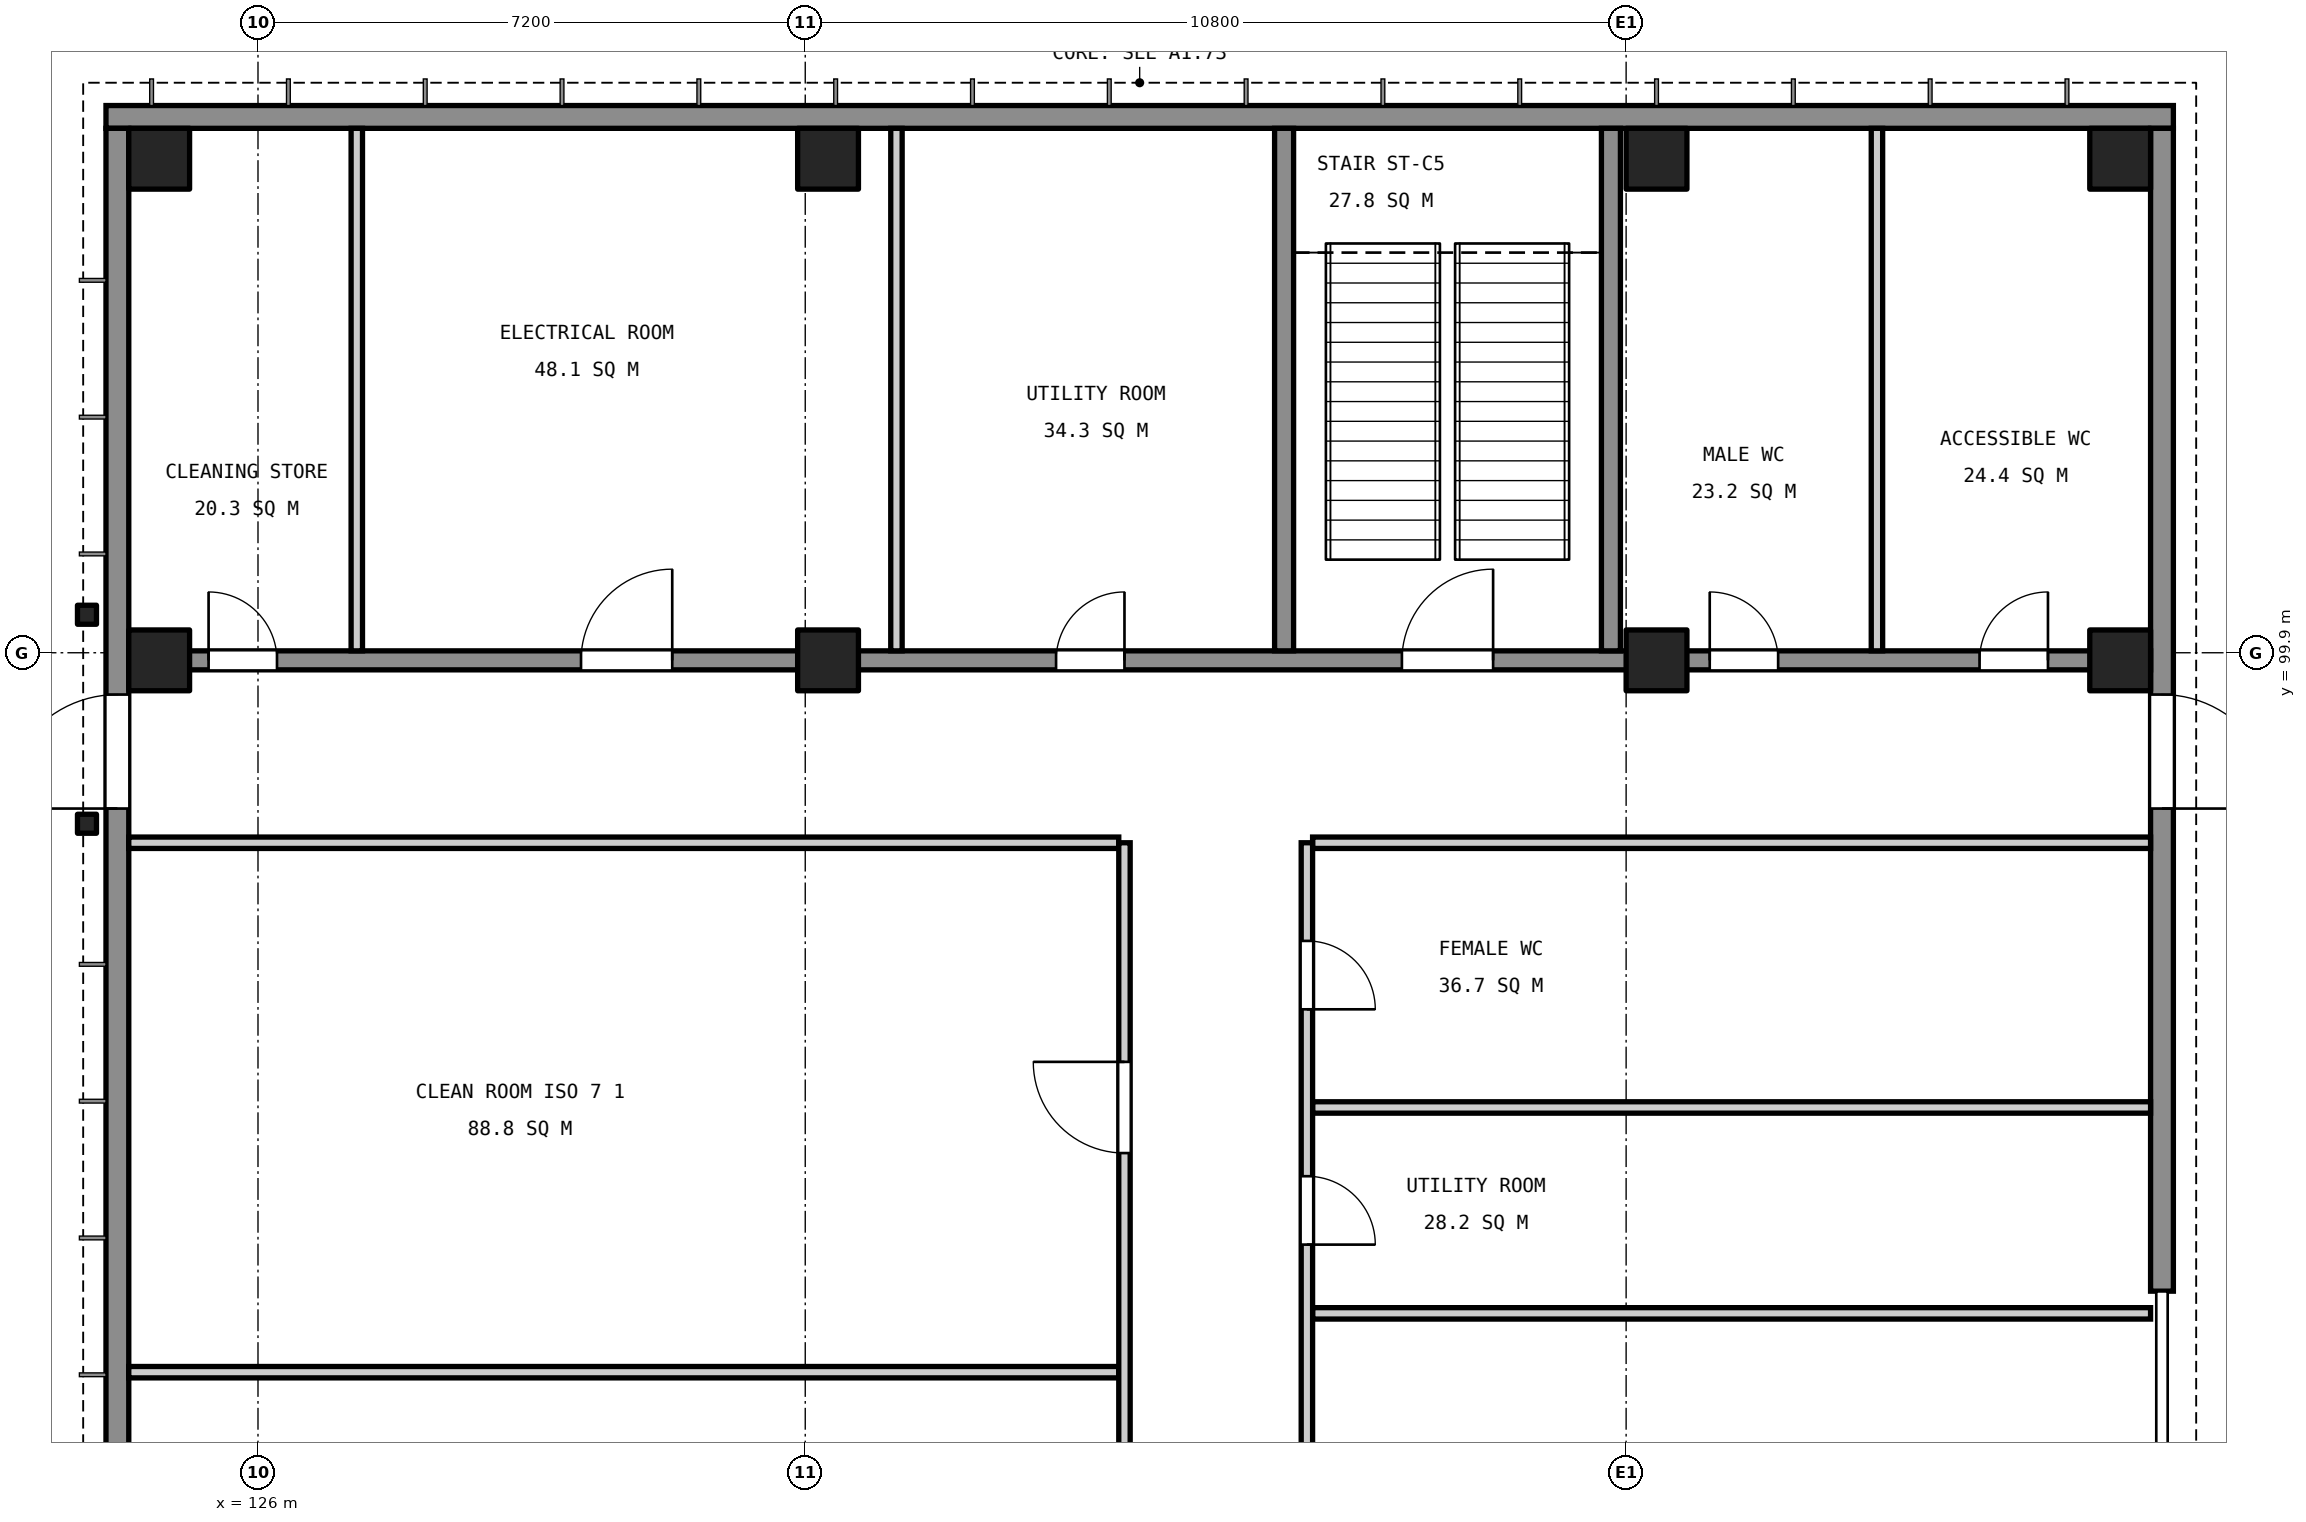
"""IFC4 building model, lengths in metres.
Left out: names, types, materials, properties, quantities, classifications, styles, units other than length and angle.
Written with IfcOpenShell. Run it as: python <this file> out.ifc"""

import sys

from ifc_helpers import new_model, si_unit, direction, frame, frame_2d, origin, origin_2d, place, context, subcontext, project, spatial, rectangle, i_section, extrude, element, fill, save


model = new_model("IFC4")
c1 = context("Model", 3, precision=1e-05, world=origin(), true_north=direction((0.0, 1.0)))
c2 = subcontext(c1, "Body", "Model", "MODEL_VIEW")
j1 = project(units=[si_unit("LENGTHUNIT", "METRE"), si_unit("PLANEANGLEUNIT", "RADIAN")], contexts=[c1])
p1 = place(None, origin())
s1 = spatial("IfcSite", under=j1, at=p1, CompositionType="ELEMENT")
p2 = place(p1, origin())
s2 = spatial("IfcBuilding", under=s1, at=p2, CompositionType="ELEMENT")
p3 = place(p2, origin())
s3 = spatial("IfcBuildingStorey", under=s2, at=p3, CompositionType="ELEMENT", Elevation=0.0)
for number, where, z_axis, x_axis in (
    (1, (124.7, 99.8, 0.0), (0.0, 0.0, 1.0), (1.0, 0.0, 0.0)),
    (2, (124.7, 106.4, 0.0), (0.0, 0.0, 1.0), (1.0, 0.0, 0.0)),
    (3, (133.5, 99.8, 0.0), (0.0, 0.0, 1.0), (1.0, 0.0, 0.0)),
    (4, (133.5, 106.4, 0.0), (0.0, 0.0, 1.0), (1.0, 0.0, 0.0)),
    (5, (144.4, 99.8, 0.0), (0.0, 0.0, 1.0), (1.0, 0.0, 0.0)),
    (6, (144.4, 106.4, 0.0), (0.0, 0.0, 1.0), (1.0, 0.0, 0.0)),
    (7, (150.5, 99.8, 0.0), (0.0, 0.0, 1.0), (1.0, 0.0, 0.0)),
    (8, (150.5, 106.4, 0.0), (0.0, 0.0, 1.0), (1.0, 0.0, 0.0)),
):
    element("IfcColumn", number, at=place(p3, frame(where, z_axis=z_axis, x_axis=x_axis)), inside=s3, PredefinedType="COLUMN", context=c2, shape_type="SweptSolid", body=[
        extrude(rectangle(XDim=0.8, YDim=0.8, at=origin_2d()), origin(), (0.0, 0.0, 1.0), 6.0),
    ])
p4 = place(p3, frame((124.0, 106.95, 0.0), z_axis=(0.0, 0.0, 1.0), x_axis=(1.0, 0.0, 0.0)))
e9 = element("IfcWall", 9, at=p4, inside=s3, PredefinedType="SOLIDWALL", context=c2, shape_type="SweptSolid", body=[
    extrude(rectangle(XDim=27.2, YDim=0.3, at=frame_2d((13.6, 0.0))), origin(), (0.0, 0.0, 1.0), 5.55),
])
p5 = place(p3, frame((124.15, 70.3, 0.0), z_axis=(0.0, 0.0, 1.0), x_axis=(0.0, 1.0, 0.0)))
e10 = element("IfcWall", 10, at=p5, inside=s3, PredefinedType="SOLIDWALL", context=c2, shape_type="SweptSolid", body=[
    extrude(rectangle(XDim=36.5, YDim=0.3, at=frame_2d((18.25, 0.0))), origin(), (0.0, 0.0, 1.0), 5.55),
])
p6 = place(p5, frame((27.55, 0.0, 0.0)))
e11 = element("IfcOpeningElement", 11, at=p6, cuts=e10, PredefinedType="OPENING", context=c2, shape_type="SweptSolid", body=[
    extrude(rectangle(XDim=1.5, YDim=2.4, at=frame_2d((0.75, 1.2))), frame((0.0, 0.16, 0.0), z_axis=(0.0, -1.0, 0.0), x_axis=(1.0, 0.0, 0.0)), (0.0, 0.0, 1.0), 0.32),
])
p7 = place(p3, frame((151.05, 91.5, 0.0), z_axis=(0.0, 0.0, 1.0), x_axis=(0.0, 1.0, 0.0)))
e12 = element("IfcWall", 12, at=p7, inside=s3, PredefinedType="SOLIDWALL", context=c2, shape_type="SweptSolid", body=[
    extrude(rectangle(XDim=15.3, YDim=0.3, at=frame_2d((7.65, 0.0))), origin(), (0.0, 0.0, 1.0), 5.55),
])
p8 = place(p7, frame((6.35, 0.0, 0.0)))
e13 = element("IfcOpeningElement", 13, at=p8, cuts=e12, PredefinedType="OPENING", context=c2, shape_type="SweptSolid", body=[
    extrude(rectangle(XDim=1.5, YDim=2.4, at=frame_2d((0.75, 1.2))), frame((0.0, 0.16, 0.0), z_axis=(0.0, -1.0, 0.0), x_axis=(1.0, 0.0, 0.0)), (0.0, 0.0, 1.0), 0.32),
])
p9 = place(p3, frame((124.3, 90.434, 0.0), z_axis=(0.0, 0.0, 1.0), x_axis=(1.0, 0.0, 0.0)))
e14 = element("IfcWall", 14, at=p9, inside=s3, PredefinedType="SOLIDWALL", context=c2, shape_type="SweptSolid", body=[
    extrude(rectangle(XDim=13.025, YDim=0.15, at=frame_2d((6.512, 0.0))), origin(), (0.0, 0.0, 1.0), 5.55),
])
for number, where, z_axis, x_axis in (
    (15, (139.875, 91.208, 0.0), (0.0, 0.0, 1.0), (1.0, 0.0, 0.0)),
    (16, (139.875, 93.917, 0.0), (0.0, 0.0, 1.0), (1.0, 0.0, 0.0)),
):
    element("IfcWall", number, at=place(p3, frame(where, z_axis=z_axis, x_axis=x_axis)), inside=s3, PredefinedType="SOLIDWALL", context=c2, shape_type="SweptSolid", body=[
        extrude(rectangle(XDim=11.025, YDim=0.15, at=frame_2d((5.512, 0.0))), origin(), (0.0, 0.0, 1.0), 5.55),
    ])
p10 = place(p3, frame((124.3, 97.4, 0.0), z_axis=(0.0, 0.0, 1.0), x_axis=(1.0, 0.0, 0.0)))
e17 = element("IfcWall", 17, at=p10, inside=s3, PredefinedType="SOLIDWALL", context=c2, shape_type="SweptSolid", body=[
    extrude(rectangle(XDim=13.025, YDim=0.15, at=frame_2d((6.512, 0.0))), origin(), (0.0, 0.0, 1.0), 5.55),
])
p11 = place(p3, frame((139.875, 97.4, 0.0), z_axis=(0.0, 0.0, 1.0), x_axis=(1.0, 0.0, 0.0)))
e18 = element("IfcWall", 18, at=p11, inside=s3, PredefinedType="SOLIDWALL", context=c2, shape_type="SweptSolid", body=[
    extrude(rectangle(XDim=11.025, YDim=0.15, at=frame_2d((5.512, 0.0))), origin(), (0.0, 0.0, 1.0), 5.55),
])
p12 = place(p3, frame((124.3, 99.8, 0.0), z_axis=(0.0, 0.0, 1.0), x_axis=(1.0, 0.0, 0.0)))
e19 = element("IfcWall", 19, at=p12, inside=s3, PredefinedType="SOLIDWALL", context=c2, shape_type="SweptSolid", body=[
    extrude(rectangle(XDim=26.6, YDim=0.25, at=frame_2d((13.3, 0.0))), origin(), (0.0, 0.0, 1.0), 5.55),
])
p13 = place(p12, frame((1.05, 0.0, 0.0)))
e20 = element("IfcOpeningElement", 20, at=p13, cuts=e19, PredefinedType="OPENING", context=c2, shape_type="SweptSolid", body=[
    extrude(rectangle(XDim=0.9, YDim=2.1, at=frame_2d((0.45, 1.05))), frame((0.0, 0.135, 0.0), z_axis=(0.0, -1.0, 0.0), x_axis=(1.0, 0.0, 0.0)), (0.0, 0.0, 1.0), 0.27),
])
p14 = place(p12, frame((5.95, 0.0, 0.0)))
e21 = element("IfcOpeningElement", 21, at=p14, cuts=e19, PredefinedType="OPENING", context=c2, shape_type="SweptSolid", body=[
    extrude(rectangle(XDim=1.2, YDim=2.1, at=frame_2d((0.6, 1.05))), frame((0.0, 0.135, 0.0), z_axis=(0.0, -1.0, 0.0), x_axis=(1.0, 0.0, 0.0)), (0.0, 0.0, 1.0), 0.27),
])
p15 = place(p12, frame((20.8, 0.0, 0.0)))
e22 = element("IfcOpeningElement", 22, at=p15, cuts=e19, PredefinedType="OPENING", context=c2, shape_type="SweptSolid", body=[
    extrude(rectangle(XDim=0.9, YDim=2.1, at=frame_2d((0.45, 1.05))), frame((0.0, 0.135, 0.0), z_axis=(0.0, -1.0, 0.0), x_axis=(1.0, 0.0, 0.0)), (0.0, 0.0, 1.0), 0.27),
])
p16 = place(p12, frame((24.35, 0.0, 0.0)))
e23 = element("IfcOpeningElement", 23, at=p16, cuts=e19, PredefinedType="OPENING", context=c2, shape_type="SweptSolid", body=[
    extrude(rectangle(XDim=0.9, YDim=2.1, at=frame_2d((0.45, 1.05))), frame((0.0, 0.135, 0.0), z_axis=(0.0, -1.0, 0.0), x_axis=(1.0, 0.0, 0.0)), (0.0, 0.0, 1.0), 0.27),
])
p17 = place(p12, frame((12.2, 0.0, 0.0)))
e24 = element("IfcOpeningElement", 24, at=p17, cuts=e19, PredefinedType="OPENING", context=c2, shape_type="SweptSolid", body=[
    extrude(rectangle(XDim=0.9, YDim=2.1, at=frame_2d((0.45, 1.05))), frame((0.0, 0.135, 0.0), z_axis=(0.0, -1.0, 0.0), x_axis=(1.0, 0.0, 0.0)), (0.0, 0.0, 1.0), 0.27),
])
p18 = place(p12, frame((16.75, 0.0, 0.0)))
e25 = element("IfcOpeningElement", 25, at=p18, cuts=e19, PredefinedType="OPENING", context=c2, shape_type="SweptSolid", body=[
    extrude(rectangle(XDim=1.2, YDim=2.1, at=frame_2d((0.6, 1.05))), frame((0.0, 0.135, 0.0), z_axis=(0.0, -1.0, 0.0), x_axis=(1.0, 0.0, 0.0)), (0.0, 0.0, 1.0), 0.27),
])
for number, where, z_axis, x_axis in (
    (26, (127.3, 99.925, 0.0), (0.0, 0.0, 1.0), (0.0, 1.0, 0.0)),
    (27, (134.4, 99.925, 0.0), (0.0, 0.0, 1.0), (0.0, 1.0, 0.0)),
):
    element("IfcWall", number, at=place(p3, frame(where, z_axis=z_axis, x_axis=x_axis)), inside=s3, PredefinedType="SOLIDWALL", context=c2, shape_type="SweptSolid", body=[
        extrude(rectangle(XDim=6.875, YDim=0.15, at=frame_2d((3.438, 0.0))), origin(), (0.0, 0.0, 1.0), 5.55),
    ])
p19 = place(p3, frame((137.4, 79.7, 0.0), z_axis=(0.0, 0.0, 1.0), x_axis=(0.0, 1.0, 0.0)))
e28 = element("IfcWall", 28, at=p19, inside=s3, PredefinedType="SOLIDWALL", context=c2, shape_type="SweptSolid", body=[
    extrude(rectangle(XDim=17.7, YDim=0.15, at=frame_2d((8.85, 0.0))), origin(), (0.0, 0.0, 1.0), 5.55),
])
p20 = place(p19, frame((0.8, 0.0, 0.0)))
e29 = element("IfcOpeningElement", 29, at=p20, cuts=e28, PredefinedType="OPENING", context=c2, shape_type="SweptSolid", body=[
    extrude(rectangle(XDim=1.2, YDim=2.1, at=frame_2d((0.6, 1.05))), frame((0.0, 0.085, 0.0), z_axis=(0.0, -1.0, 0.0), x_axis=(1.0, 0.0, 0.0)), (0.0, 0.0, 1.0), 0.17),
])
p21 = place(p19, frame((4.619, 0.0, 0.0)))
e30 = element("IfcOpeningElement", 30, at=p21, cuts=e28, PredefinedType="OPENING", context=c2, shape_type="SweptSolid", body=[
    extrude(rectangle(XDim=1.2, YDim=2.1, at=frame_2d((0.6, 1.05))), frame((0.0, 0.085, 0.0), z_axis=(0.0, -1.0, 0.0), x_axis=(1.0, 0.0, 0.0)), (0.0, 0.0, 1.0), 0.17),
])
p22 = place(p19, frame((8.586, 0.0, 0.0)))
e31 = element("IfcOpeningElement", 31, at=p22, cuts=e28, PredefinedType="OPENING", context=c2, shape_type="SweptSolid", body=[
    extrude(rectangle(XDim=1.2, YDim=2.1, at=frame_2d((0.6, 1.05))), frame((0.0, 0.085, 0.0), z_axis=(0.0, -1.0, 0.0), x_axis=(1.0, 0.0, 0.0)), (0.0, 0.0, 1.0), 0.17),
])
p23 = place(p19, frame((13.617, 0.0, 0.0)))
e32 = element("IfcOpeningElement", 32, at=p23, cuts=e28, PredefinedType="OPENING", context=c2, shape_type="SweptSolid", body=[
    extrude(rectangle(XDim=1.2, YDim=2.1, at=frame_2d((0.6, 1.05))), frame((0.0, 0.085, 0.0), z_axis=(0.0, -1.0, 0.0), x_axis=(1.0, 0.0, 0.0)), (0.0, 0.0, 1.0), 0.17),
])
p24 = place(p3, frame((139.5, 99.925, 0.0), z_axis=(0.0, 0.0, 1.0), x_axis=(0.0, 1.0, 0.0)))
e33 = element("IfcWall", 33, at=p24, inside=s3, PredefinedType="SOLIDWALL", context=c2, shape_type="SweptSolid", body=[
    extrude(rectangle(XDim=6.875, YDim=0.25, at=frame_2d((3.438, 0.0))), origin(), (0.0, 0.0, 1.0), 5.55),
])
p25 = place(p3, frame((139.8, 82.5, 0.0), z_axis=(0.0, 0.0, 1.0), x_axis=(0.0, 1.0, 0.0)))
e34 = element("IfcWall", 34, at=p25, inside=s3, PredefinedType="SOLIDWALL", context=c2, shape_type="SweptSolid", body=[
    extrude(rectangle(XDim=14.9, YDim=0.15, at=frame_2d((7.45, 0.0))), origin(), (0.0, 0.0, 1.0), 5.55),
])
p26 = place(p25, frame((3.754, 0.0, 0.0)))
e35 = element("IfcOpeningElement", 35, at=p26, cuts=e34, PredefinedType="OPENING", context=c2, shape_type="SweptSolid", body=[
    extrude(rectangle(XDim=1.2, YDim=2.1, at=frame_2d((0.6, 1.05))), frame((0.0, 0.085, 0.0), z_axis=(0.0, -1.0, 0.0), x_axis=(1.0, 0.0, 0.0)), (0.0, 0.0, 1.0), 0.17),
])
p27 = place(p25, frame((9.613, 0.0, 0.0)))
e36 = element("IfcOpeningElement", 36, at=p27, cuts=e34, PredefinedType="OPENING", context=c2, shape_type="SweptSolid", body=[
    extrude(rectangle(XDim=0.9, YDim=2.1, at=frame_2d((0.45, 1.05))), frame((0.0, 0.085, 0.0), z_axis=(0.0, -1.0, 0.0), x_axis=(1.0, 0.0, 0.0)), (0.0, 0.0, 1.0), 0.17),
])
p28 = place(p25, frame((12.708, 0.0, 0.0)))
e37 = element("IfcOpeningElement", 37, at=p28, cuts=e34, PredefinedType="OPENING", context=c2, shape_type="SweptSolid", body=[
    extrude(rectangle(XDim=0.9, YDim=2.1, at=frame_2d((0.45, 1.05))), frame((0.0, 0.085, 0.0), z_axis=(0.0, -1.0, 0.0), x_axis=(1.0, 0.0, 0.0)), (0.0, 0.0, 1.0), 0.17),
])
p29 = place(p3, frame((143.8, 99.925, 0.0), z_axis=(0.0, 0.0, 1.0), x_axis=(0.0, 1.0, 0.0)))
e38 = element("IfcWall", 38, at=p29, inside=s3, PredefinedType="SOLIDWALL", context=c2, shape_type="SweptSolid", body=[
    extrude(rectangle(XDim=6.875, YDim=0.25, at=frame_2d((3.438, 0.0))), origin(), (0.0, 0.0, 1.0), 5.55),
])
p30 = place(p3, frame((147.3, 99.925, 0.0), z_axis=(0.0, 0.0, 1.0), x_axis=(0.0, 1.0, 0.0)))
e39 = element("IfcWall", 39, at=p30, inside=s3, PredefinedType="SOLIDWALL", context=c2, shape_type="SweptSolid", body=[
    extrude(rectangle(XDim=6.875, YDim=0.15, at=frame_2d((3.438, 0.0))), origin(), (0.0, 0.0, 1.0), 5.55),
])
for number, where, z_axis, x_axis in (
    (40, (123.75, 97.65, 0.0), (0.0, 0.0, 1.0), (1.0, 0.0, 0.0)),
    (41, (123.75, 100.4, 0.0), (0.0, 0.0, 1.0), (1.0, 0.0, 0.0)),
):
    element("IfcColumn", number, at=place(p3, frame(where, z_axis=z_axis, x_axis=x_axis)), inside=s3, PredefinedType="COLUMN", context=c2, shape_type="SweptSolid", body=[
        extrude(i_section(OverallWidth=0.25, OverallDepth=0.25, WebThickness=0.009, FlangeThickness=0.014, FilletRadius=0.016, at=origin_2d()), origin(), (0.0, 0.0, 1.0), 4.8),
    ])
p31 = place(p23, origin())
e42 = element("IfcDoor", 42, at=p31, inside=s3, OperationType="SINGLE_SWING_RIGHT", PredefinedType="DOOR", context=c2, shape_type="SweptSolid", body=[
    extrude(rectangle(XDim=1.2, YDim=2.1, at=frame_2d((0.6, 1.05))), frame((0.0, 0.025, 0.0), z_axis=(0.0, -1.0, 0.0), x_axis=(1.0, 0.0, 0.0)), (0.0, 0.0, 1.0), 0.05),
])
fill(e32, e42)
p32 = place(p27, frame((0.9, 0.0, 0.0), z_axis=(0.0, 0.0, 1.0), x_axis=(-1.0, 0.0, 0.0)))
e43 = element("IfcDoor", 43, at=p32, inside=s3, OperationType="SINGLE_SWING_RIGHT", PredefinedType="DOOR", context=c2, shape_type="SweptSolid", body=[
    extrude(rectangle(XDim=0.9, YDim=2.1, at=frame_2d((0.45, 1.05))), frame((0.0, 0.025, 0.0), z_axis=(0.0, -1.0, 0.0), x_axis=(1.0, 0.0, 0.0)), (0.0, 0.0, 1.0), 0.05),
])
fill(e36, e43)
p33 = place(p28, frame((0.9, 0.0, 0.0), z_axis=(0.0, 0.0, 1.0), x_axis=(-1.0, 0.0, 0.0)))
e44 = element("IfcDoor", 44, at=p33, inside=s3, OperationType="SINGLE_SWING_RIGHT", PredefinedType="DOOR", context=c2, shape_type="SweptSolid", body=[
    extrude(rectangle(XDim=0.9, YDim=2.1, at=frame_2d((0.45, 1.05))), frame((0.0, 0.025, 0.0), z_axis=(0.0, -1.0, 0.0), x_axis=(1.0, 0.0, 0.0)), (0.0, 0.0, 1.0), 0.05),
])
fill(e37, e44)
p34 = place(p13, origin())
e45 = element("IfcDoor", 45, at=p34, inside=s3, OperationType="SINGLE_SWING_LEFT", PredefinedType="DOOR", context=c2, shape_type="SweptSolid", body=[
    extrude(rectangle(XDim=0.9, YDim=2.1, at=frame_2d((0.45, 1.05))), frame((0.0, 0.025, 0.0), z_axis=(0.0, -1.0, 0.0), x_axis=(1.0, 0.0, 0.0)), (0.0, 0.0, 1.0), 0.05),
])
fill(e20, e45)
p35 = place(p14, origin())
e46 = element("IfcDoor", 46, at=p35, inside=s3, OperationType="SINGLE_SWING_RIGHT", PredefinedType="DOOR", context=c2, shape_type="SweptSolid", body=[
    extrude(rectangle(XDim=1.2, YDim=2.1, at=frame_2d((0.6, 1.05))), frame((0.0, 0.025, 0.0), z_axis=(0.0, -1.0, 0.0), x_axis=(1.0, 0.0, 0.0)), (0.0, 0.0, 1.0), 0.05),
])
fill(e21, e46)
p36 = place(p15, origin())
e47 = element("IfcDoor", 47, at=p36, inside=s3, OperationType="SINGLE_SWING_LEFT", PredefinedType="DOOR", context=c2, shape_type="SweptSolid", body=[
    extrude(rectangle(XDim=0.9, YDim=2.1, at=frame_2d((0.45, 1.05))), frame((0.0, 0.025, 0.0), z_axis=(0.0, -1.0, 0.0), x_axis=(1.0, 0.0, 0.0)), (0.0, 0.0, 1.0), 0.05),
])
fill(e22, e47)
p37 = place(p16, origin())
e48 = element("IfcDoor", 48, at=p37, inside=s3, OperationType="SINGLE_SWING_RIGHT", PredefinedType="DOOR", context=c2, shape_type="SweptSolid", body=[
    extrude(rectangle(XDim=0.9, YDim=2.1, at=frame_2d((0.45, 1.05))), frame((0.0, 0.025, 0.0), z_axis=(0.0, -1.0, 0.0), x_axis=(1.0, 0.0, 0.0)), (0.0, 0.0, 1.0), 0.05),
])
fill(e23, e48)
p38 = place(p17, origin())
e49 = element("IfcDoor", 49, at=p38, inside=s3, OperationType="SINGLE_SWING_RIGHT", PredefinedType="DOOR", context=c2, shape_type="SweptSolid", body=[
    extrude(rectangle(XDim=0.9, YDim=2.1, at=frame_2d((0.45, 1.05))), frame((0.0, 0.025, 0.0), z_axis=(0.0, -1.0, 0.0), x_axis=(1.0, 0.0, 0.0)), (0.0, 0.0, 1.0), 0.05),
])
fill(e24, e49)
p39 = place(p18, origin())
e50 = element("IfcDoor", 50, at=p39, inside=s3, OperationType="SINGLE_SWING_RIGHT", PredefinedType="DOOR", context=c2, shape_type="SweptSolid", body=[
    extrude(rectangle(XDim=1.2, YDim=2.1, at=frame_2d((0.6, 1.05))), frame((0.0, 0.025, 0.0), z_axis=(0.0, -1.0, 0.0), x_axis=(1.0, 0.0, 0.0)), (0.0, 0.0, 1.0), 0.05),
])
fill(e25, e50)
p40 = place(p8, frame((1.5, 0.0, 0.0), z_axis=(0.0, 0.0, 1.0), x_axis=(-1.0, 0.0, 0.0)))
e51 = element("IfcDoor", 51, at=p40, inside=s3, OperationType="SINGLE_SWING_RIGHT", PredefinedType="DOOR", context=c2, shape_type="SweptSolid", body=[
    extrude(rectangle(XDim=1.5, YDim=2.4, at=frame_2d((0.75, 1.2))), frame((0.0, 0.025, 0.0), z_axis=(0.0, -1.0, 0.0), x_axis=(1.0, 0.0, 0.0)), (0.0, 0.0, 1.0), 0.05),
])
fill(e13, e51)
p41 = place(p6, origin())
e52 = element("IfcDoor", 52, at=p41, inside=s3, OperationType="SINGLE_SWING_LEFT", PredefinedType="DOOR", context=c2, shape_type="SweptSolid", body=[
    extrude(rectangle(XDim=1.5, YDim=2.4, at=frame_2d((0.75, 1.2))), frame((0.0, 0.025, 0.0), z_axis=(0.0, -1.0, 0.0), x_axis=(1.0, 0.0, 0.0)), (0.0, 0.0, 1.0), 0.05),
])
fill(e11, e52)
save(model, sys.argv[1])
